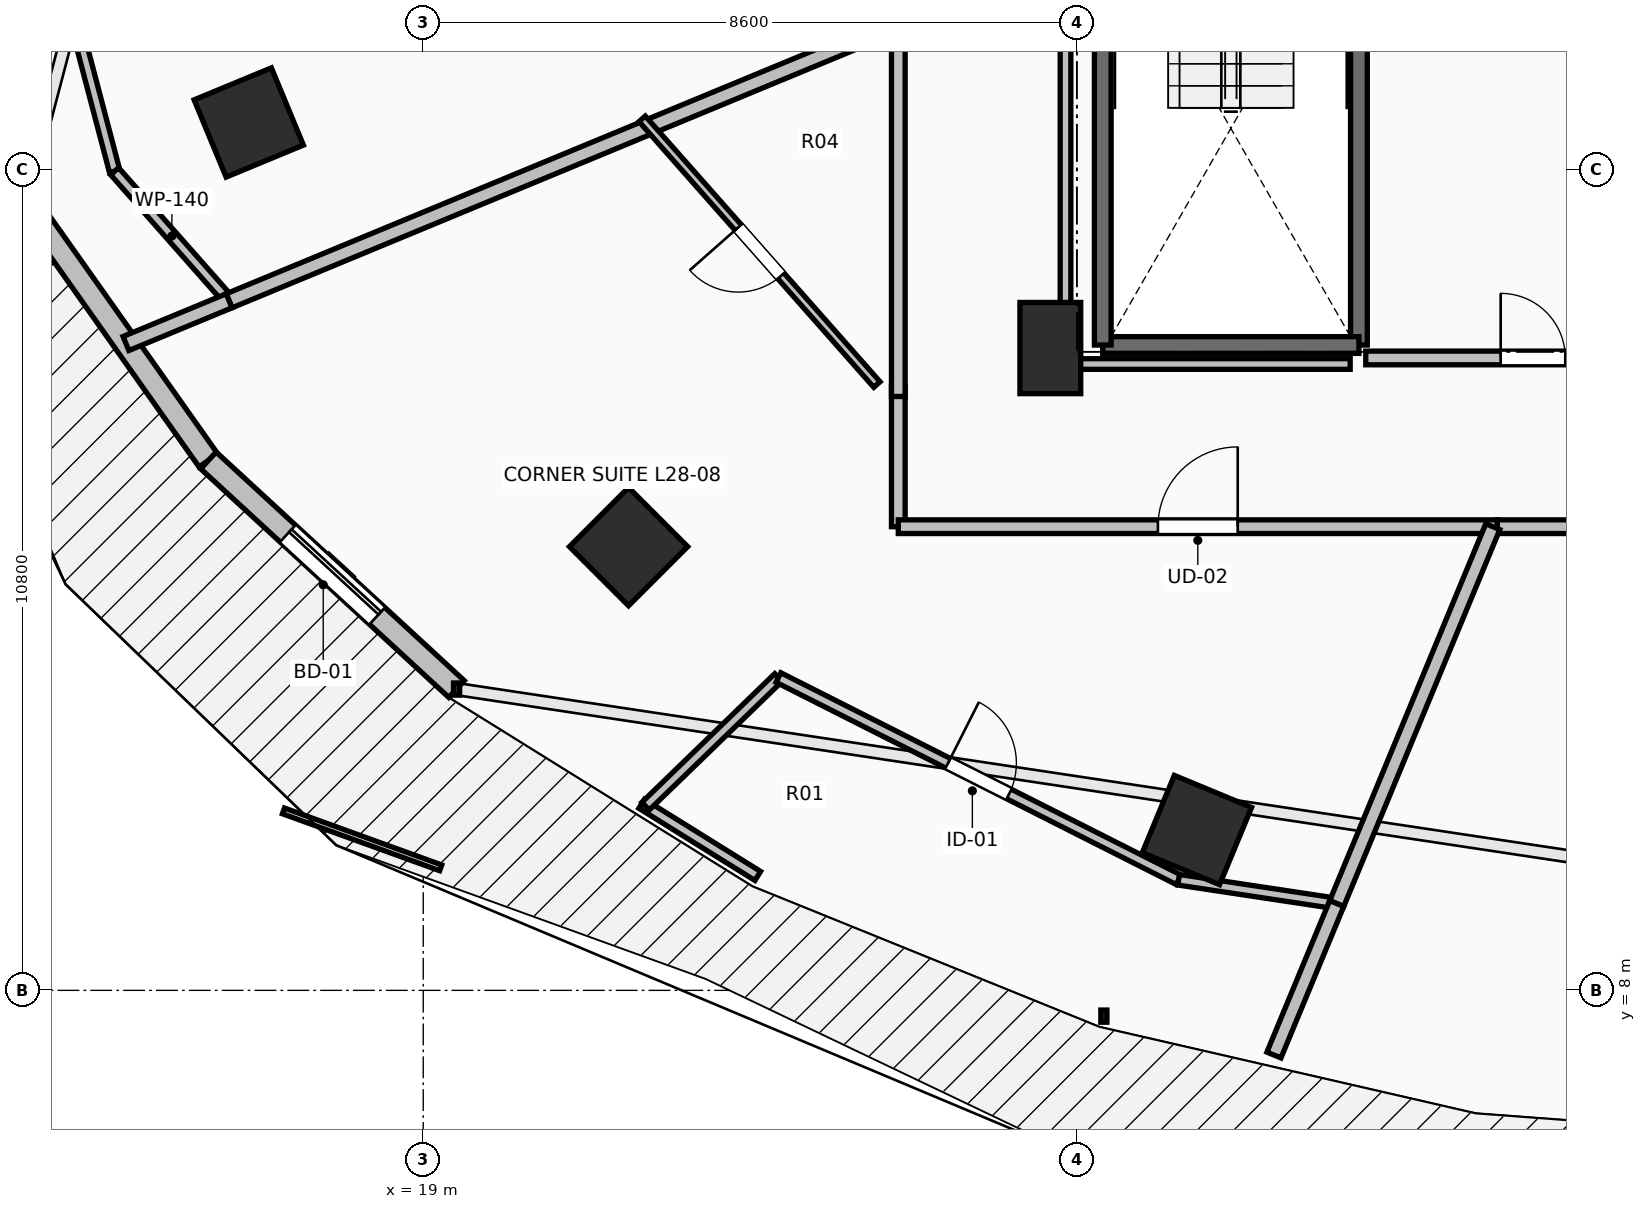
"""IFC4 building model, lengths in metres.
Left out: names, types, materials, properties, quantities, classifications, styles, units other than length and angle.
Written with IfcOpenShell. Run it as: python <this file> out.ifc"""

import sys

from ifc_helpers import new_model, si_unit, direction, frame, frame_2d, origin, origin_2d, place, context, subcontext, project, spatial, rectangle, extrude, element, fill, save


model = new_model("IFC4")
c1 = context("Model", 3, precision=1e-05, world=origin(), true_north=direction((0.0, 1.0)))
c2 = subcontext(c1, "Body", "Model", "MODEL_VIEW")
j1 = project(units=[si_unit("LENGTHUNIT", "METRE"), si_unit("PLANEANGLEUNIT", "RADIAN")], contexts=[c1])
p1 = place(None, origin())
s1 = spatial("IfcSite", under=j1, at=p1, CompositionType="ELEMENT")
p2 = place(p1, origin())
s2 = spatial("IfcBuilding", under=s1, at=p2, CompositionType="ELEMENT")
p3 = place(p2, frame((0.0, 0.0, 106.8)))
s3 = spatial("IfcBuildingStorey", under=s2, at=p3, CompositionType="ELEMENT", Elevation=106.8)
for number, where, z_axis, x_axis in (
    (1, (16.705, 19.418, 0.0), (0.0, 0.0, 1.0), (-0.924, -0.383, 0.0)),
    (2, (21.701, 13.838, 0.0), (0.0, 0.0, 1.0), (-0.707, -0.707, 0.0)),
    (3, (29.179, 10.109, 0.0), (0.0, 0.0, 1.0), (-0.383, -0.924, 0.0)),
):
    element("IfcColumn", number, at=place(p3, frame(where, z_axis=z_axis, x_axis=x_axis)), inside=s3, PredefinedType="COLUMN", context=c2, shape_type="SweptSolid", body=[
        extrude(rectangle(XDim=1.1, YDim=1.1, at=origin_2d()), origin(), (0.0, 0.0, 1.0), 3.5),
    ])
p4 = place(p3, frame((27.25, 16.45, 0.0), z_axis=(0.0, 0.0, 1.0), x_axis=(1.0, 0.0, 0.0)))
e4 = element("IfcColumn", 4, at=p4, inside=s3, PredefinedType="PILASTER", context=c2, shape_type="SweptSolid", body=[
    extrude(rectangle(XDim=0.8, YDim=1.2, at=origin_2d()), origin(), (0.0, 0.0, 1.0), 3.5),
])
p5 = place(p3, frame((13.748, 18.404, 0.0), z_axis=(0.0, 0.0, 1.0), x_axis=(0.57716435238, -0.81662801222, 0.0)))
e5 = element("IfcWall", 5, at=p5, inside=s3, PredefinedType="STANDARD", context=c2, shape_type="SweptSolid", body=[
    extrude(rectangle(XDim=4.202, YDim=0.3, at=frame_2d((2.101, 0.0))), origin(), (0.0, 0.0, 1.0), 3.24),
])
p6 = place(p3, frame((16.174, 14.972, 0.0), z_axis=(0.0, 0.0, 1.0), x_axis=(0.735416718093, -0.677615119924, 0.0)))
e6 = element("IfcWall", 6, at=p6, inside=s3, PredefinedType="STANDARD", context=c2, shape_type="SweptSolid", body=[
    extrude(rectangle(XDim=4.439, YDim=0.3, at=frame_2d((2.22, 0.0))), origin(), (0.0, 0.0, 1.0), 3.24),
])
p7 = place(p6, frame((1.419, 0.0, 0.0)))
e7 = element("IfcOpeningElement", 7, at=p7, cuts=e6, PredefinedType="OPENING", context=c2, shape_type="SweptSolid", body=[
    extrude(rectangle(XDim=1.6, YDim=2.3, at=frame_2d((0.8, 1.15))), frame((0.0, 0.165, 0.0), z_axis=(0.0, -1.0, 0.0), x_axis=(1.0, 0.0, 0.0)), (0.0, 0.0, 1.0), 0.33),
])
p8 = place(p3, frame((31.31, 23.91, 0.0), z_axis=(0.0, 0.0, 1.0), x_axis=(0.0, -1.0, 0.0)))
e8 = element("IfcWall", 8, at=p8, inside=s3, PredefinedType="SOLIDWALL", context=c2, shape_type="SweptSolid", body=[
    extrude(rectangle(XDim=7.42, YDim=0.22, at=frame_2d((3.71, 0.0))), origin(), (0.0, 0.0, 1.0), 3.24),
])
p9 = place(p3, frame((31.31, 16.49, 0.0), z_axis=(0.0, 0.0, 1.0), x_axis=(-1.0, 0.0, 0.0)))
e9 = element("IfcWall", 9, at=p9, inside=s3, PredefinedType="SOLIDWALL", context=c2, shape_type="SweptSolid", body=[
    extrude(rectangle(XDim=3.37, YDim=0.22, at=frame_2d((1.685, 0.0))), origin(), (0.0, 0.0, 1.0), 3.24),
])
p10 = place(p3, frame((27.94, 16.49, 0.0), z_axis=(0.0, 0.0, 1.0), x_axis=(0.0, 1.0, 0.0)))
e10 = element("IfcWall", 10, at=p10, inside=s3, PredefinedType="SOLIDWALL", context=c2, shape_type="SweptSolid", body=[
    extrude(rectangle(XDim=7.42, YDim=0.22, at=frame_2d((3.71, 0.0))), origin(), (0.0, 0.0, 1.0), 3.24),
])
p11 = place(p3, frame((31.4, 16.32, 0.0), z_axis=(0.0, 0.0, 1.0), x_axis=(1.0, 0.0, 0.0)))
e11 = element("IfcWall", 11, at=p11, inside=s3, PredefinedType="PARTITIONING", context=c2, shape_type="SweptSolid", body=[
    extrude(rectangle(XDim=4.4, YDim=0.18, at=frame_2d((2.2, 0.0))), origin(), (0.0, 0.0, 1.0), 3.24),
])
p12 = place(p11, frame((1.775, 0.0, 0.0)))
e12 = element("IfcOpeningElement", 12, at=p12, cuts=e11, PredefinedType="OPENING", context=c2, shape_type="SweptSolid", body=[
    extrude(rectangle(XDim=0.85, YDim=2.1, at=frame_2d((0.425, 1.05))), frame((0.0, 0.105, 0.0), z_axis=(0.0, -1.0, 0.0), x_axis=(1.0, 0.0, 0.0)), (0.0, 0.0, 1.0), 0.21),
])
p13 = place(p3, frame((25.25, 15.953, 0.0), z_axis=(0.0, 0.0, 1.0), x_axis=(0.0, -1.0, 0.0)))
e13 = element("IfcWall", 13, at=p13, inside=s3, PredefinedType="PARTITIONING", context=c2, shape_type="SweptSolid", body=[
    extrude(rectangle(XDim=1.853, YDim=0.18, at=frame_2d((0.926, 0.0))), origin(), (0.0, 0.0, 1.0), 2.432),
])
p14 = place(p3, frame((25.25, 14.1, 0.0), z_axis=(0.0, 0.0, 1.0), x_axis=(1.0, 0.0, 0.0)))
e14 = element("IfcWall", 14, at=p14, inside=s3, PredefinedType="PARTITIONING", context=c2, shape_type="SweptSolid", body=[
    extrude(rectangle(XDim=7.881, YDim=0.18, at=frame_2d((3.94, 0.0))), origin(), (0.0, 0.0, 1.0), 2.432),
])
p15 = place(p14, frame((3.416, 0.0, 0.0)))
e15 = element("IfcOpeningElement", 15, at=p15, cuts=e14, PredefinedType="OPENING", context=c2, shape_type="SweptSolid", body=[
    extrude(rectangle(XDim=1.05, YDim=2.2, at=frame_2d((0.525, 1.1))), frame((0.0, 0.105, 0.0), z_axis=(0.0, -1.0, 0.0), x_axis=(1.0, 0.0, 0.0)), (0.0, 0.0, 1.0), 0.21),
])
p16 = place(p3, frame((25.25, 20.794, 0.0), z_axis=(0.0, 0.0, 1.0), x_axis=(0.0, -1.0, 0.0)))
e16 = element("IfcWall", 16, at=p16, inside=s3, PredefinedType="PARTITIONING", context=c2, shape_type="SweptSolid", body=[
    extrude(rectangle(XDim=4.981, YDim=0.18, at=frame_2d((2.49, 0.0))), origin(), (0.0, 0.0, 1.0), 2.432),
])
p17 = place(p3, frame((33.131, 14.1, 0.0), z_axis=(0.0, 0.0, 1.0), x_axis=(1.0, 0.0, 0.0)))
e17 = element("IfcWall", 17, at=p17, inside=s3, PredefinedType="PARTITIONING", context=c2, shape_type="SweptSolid", body=[
    extrude(rectangle(XDim=9.069, YDim=0.18, at=frame_2d((4.534, 0.0))), origin(), (0.0, 0.0, 1.0), 2.886),
])
p18 = place(p17, frame((4.034, 0.0, 0.0)))
e18 = element("IfcOpeningElement", 18, at=p18, cuts=e17, PredefinedType="OPENING", context=c2, shape_type="SweptSolid", body=[
    extrude(rectangle(XDim=1.0, YDim=2.15, at=frame_2d((0.5, 1.075))), frame((0.0, 0.105, 0.0), z_axis=(0.0, -1.0, 0.0), x_axis=(1.0, 0.0, 0.0)), (0.0, 0.0, 1.0), 0.21),
])
p19 = place(p3, frame((13.04, 26.0, 0.0), z_axis=(0.0, 0.0, 1.0), x_axis=(0.254345287821, -0.967113475536, 0.0)))
e19 = element("IfcWall", 19, at=p19, inside=s3, PredefinedType="PARTITIONING", context=c2, shape_type="SweptSolid", body=[
    extrude(rectangle(XDim=7.47, YDim=0.14, at=frame_2d((3.735, 0.0))), origin(), (0.0, 0.0, 1.0), 3.24),
])
p20 = place(p19, frame((3.285, 0.0, 0.0)))
e20 = element("IfcOpeningElement", 20, at=p20, cuts=e19, PredefinedType="OPENING", context=c2, shape_type="SweptSolid", body=[
    extrude(rectangle(XDim=0.9, YDim=2.1, at=frame_2d((0.45, 1.05))), frame((0.0, 0.085, 0.0), z_axis=(0.0, -1.0, 0.0), x_axis=(1.0, 0.0, 0.0)), (0.0, 0.0, 1.0), 0.17),
])
p21 = place(p3, frame((14.94, 18.776, 0.0), z_axis=(0.0, 0.0, 1.0), x_axis=(0.662288913482, -0.749248553605, 0.0)))
e21 = element("IfcWall", 21, at=p21, inside=s3, PredefinedType="PARTITIONING", context=c2, shape_type="SweptSolid", body=[
    extrude(rectangle(XDim=2.274, YDim=0.14, at=frame_2d((1.137, 0.0))), origin(), (0.0, 0.0, 1.0), 3.24),
])
p22 = place(p3, frame((16.446, 17.072, 0.0), z_axis=(0.0, 0.0, 1.0), x_axis=(0.92387006918, 0.382706278068, 0.0)))
e22 = element("IfcWall", 22, at=p22, inside=s3, PredefinedType="PARTITIONING", context=c2, shape_type="SweptSolid", body=[
    extrude(rectangle(XDim=9.53, YDim=0.2, at=frame_2d((4.765, 0.0))), origin(), (0.0, 0.0, 1.0), 2.432),
])
p23 = place(p3, frame((15.089, 16.51, 0.0), z_axis=(0.0, 0.0, 1.0), x_axis=(0.923891226159, 0.382655200183, 0.0)))
e23 = element("IfcWall", 23, at=p23, inside=s3, PredefinedType="PARTITIONING", context=c2, shape_type="SweptSolid", body=[
    extrude(rectangle(XDim=1.469, YDim=0.2, at=frame_2d((0.734, 0.0))), origin(), (0.0, 0.0, 1.0), 3.24),
])
p24 = place(p3, frame((24.969, 15.97, 0.0), z_axis=(0.0, 0.0, 1.0), x_axis=(-0.662106207726, 0.749410014405, 0.0)))
e24 = element("IfcWall", 24, at=p24, inside=s3, PredefinedType="PARTITIONING", context=c2, shape_type="SweptSolid", body=[
    extrude(rectangle(XDim=4.665, YDim=0.11, at=frame_2d((2.332, 0.0))), origin(), (0.0, 0.0, 1.0), 2.432),
])
p25 = place(p24, frame((1.907, 0.0, 0.0)))
e25 = element("IfcOpeningElement", 25, at=p25, cuts=e24, PredefinedType="OPENING", context=c2, shape_type="SweptSolid", body=[
    extrude(rectangle(XDim=0.85, YDim=2.1, at=frame_2d((0.425, 1.05))), frame((0.0, 0.07, 0.0), z_axis=(0.0, -1.0, 0.0), x_axis=(1.0, 0.0, 0.0)), (0.0, 0.0, 1.0), 0.14),
])
p26 = place(p3, frame((21.874, 10.455, 0.0), z_axis=(0.0, 0.0, 1.0), x_axis=(0.849018711668, -0.528362779951, 0.0)))
e26 = element("IfcWall", 26, at=p26, inside=s3, PredefinedType="PARTITIONING", context=c2, shape_type="SweptSolid", body=[
    extrude(rectangle(XDim=1.798, YDim=0.14, at=frame_2d((0.899, 0.0))), origin(), (0.0, 0.0, 1.0), 3.24),
])
p27 = place(p3, frame((21.925, 10.423, 0.0), z_axis=(0.0, 0.0, 1.0), x_axis=(0.718353026202, 0.695678754704, 0.0)))
e27 = element("IfcWall", 27, at=p27, inside=s3, PredefinedType="PARTITIONING", context=c2, shape_type="SweptSolid", body=[
    extrude(rectangle(XDim=2.433, YDim=0.14, at=frame_2d((1.217, 0.0))), origin(), (0.0, 0.0, 1.0), 3.24),
])
p28 = place(p3, frame((23.673, 12.116, 0.0), z_axis=(0.0, 0.0, 1.0), x_axis=(0.892490283816, -0.451066617357, 0.0)))
e28 = element("IfcWall", 28, at=p28, inside=s3, PredefinedType="PARTITIONING", context=c2, shape_type="SweptSolid", body=[
    extrude(rectangle(XDim=5.899, YDim=0.14, at=frame_2d((2.95, 0.0))), origin(), (0.0, 0.0, 1.0), 3.24),
])
p29 = place(p28, frame((2.5, 0.0, 0.0)))
e29 = element("IfcOpeningElement", 29, at=p29, cuts=e28, PredefinedType="OPENING", context=c2, shape_type="SweptSolid", body=[
    extrude(rectangle(XDim=0.9, YDim=2.1, at=frame_2d((0.45, 1.05))), frame((0.0, 0.085, 0.0), z_axis=(0.0, -1.0, 0.0), x_axis=(1.0, 0.0, 0.0)), (0.0, 0.0, 1.0), 0.17),
])
p30 = place(p3, frame((28.938, 9.455, 0.0), z_axis=(0.0, 0.0, 1.0), x_axis=(0.988868142427, -0.148794478708, 0.0)))
e30 = element("IfcWall", 30, at=p30, inside=s3, PredefinedType="PARTITIONING", context=c2, shape_type="SweptSolid", body=[
    extrude(rectangle(XDim=2.104, YDim=0.14, at=frame_2d((1.052, 0.0))), origin(), (0.0, 0.0, 1.0), 3.24),
])
p31 = place(p3, frame((31.018, 9.142, 0.0), z_axis=(0.0, 0.0, 1.0), x_axis=(0.382572793579, 0.923925352836, 0.0)))
e31 = element("IfcWall", 31, at=p31, inside=s3, PredefinedType="PARTITIONING", context=c2, shape_type="SweptSolid", body=[
    extrude(rectangle(XDim=5.366, YDim=0.2, at=frame_2d((2.683, 0.0))), origin(), (0.0, 0.0, 1.0), 2.677),
])
p32 = place(p3, frame((30.192, 7.149, 0.0), z_axis=(0.0, 0.0, 1.0), x_axis=(0.382911401564, 0.923785071622, 0.0)))
e32 = element("IfcWall", 32, at=p32, inside=s3, PredefinedType="PARTITIONING", context=c2, shape_type="SweptSolid", body=[
    extrude(rectangle(XDim=2.158, YDim=0.2, at=frame_2d((1.079, 0.0))), origin(), (0.0, 0.0, 1.0), 3.24),
])
p33 = place(p3, frame((31.195, 16.24, 0.0), z_axis=(0.0, 0.0, 1.0), x_axis=(-1.0, 0.0, 0.0)))
e33 = element("IfcWall", 33, at=p33, inside=s3, PredefinedType="PARTITIONING", context=c2, shape_type="SweptSolid", body=[
    extrude(rectangle(XDim=3.745, YDim=0.14, at=frame_2d((1.873, 0.0))), origin(), (0.0, 0.0, 1.0), 2.432),
])
p34 = place(p3, frame((27.45, 16.24, 0.0), z_axis=(0.0, 0.0, 1.0), x_axis=(0.0, 1.0, 0.0)))
e34 = element("IfcWall", 34, at=p34, inside=s3, PredefinedType="PARTITIONING", context=c2, shape_type="SweptSolid", body=[
    extrude(rectangle(XDim=7.514, YDim=0.14, at=frame_2d((3.757, 0.0))), origin(), (0.0, 0.0, 1.0), 2.432),
])
p35 = place(p7, origin())
e35 = element("IfcDoor", 35, at=p35, inside=s3, OperationType="SLIDING_TO_LEFT", PredefinedType="DOOR", context=c2, shape_type="SweptSolid", body=[
    extrude(rectangle(XDim=1.6, YDim=2.3, at=frame_2d((0.8, 1.15))), frame((0.0, 0.025, 0.0), z_axis=(0.0, -1.0, 0.0), x_axis=(1.0, 0.0, 0.0)), (0.0, 0.0, 1.0), 0.05),
])
fill(e7, e35)
p36 = place(p12, origin())
e36 = element("IfcDoor", 36, at=p36, inside=s3, OperationType="SINGLE_SWING_LEFT", PredefinedType="DOOR", context=c2, shape_type="SweptSolid", body=[
    extrude(rectangle(XDim=0.85, YDim=2.1, at=frame_2d((0.425, 1.05))), frame((0.0, 0.025, 0.0), z_axis=(0.0, -1.0, 0.0), x_axis=(1.0, 0.0, 0.0)), (0.0, 0.0, 1.0), 0.05),
])
fill(e12, e36)
p37 = place(p15, origin())
e37 = element("IfcDoor", 37, at=p37, inside=s3, OperationType="SINGLE_SWING_RIGHT", PredefinedType="DOOR", context=c2, shape_type="SweptSolid", body=[
    extrude(rectangle(XDim=1.05, YDim=2.2, at=frame_2d((0.525, 1.1))), frame((0.0, 0.025, 0.0), z_axis=(0.0, -1.0, 0.0), x_axis=(1.0, 0.0, 0.0)), (0.0, 0.0, 1.0), 0.05),
])
fill(e15, e37)
p38 = place(p25, origin())
e38 = element("IfcDoor", 38, at=p38, inside=s3, OperationType="SINGLE_SWING_RIGHT", PredefinedType="DOOR", context=c2, shape_type="SweptSolid", body=[
    extrude(rectangle(XDim=0.85, YDim=2.1, at=frame_2d((0.425, 1.05))), frame((0.0, 0.025, 0.0), z_axis=(0.0, -1.0, 0.0), x_axis=(1.0, 0.0, 0.0)), (0.0, 0.0, 1.0), 0.05),
])
fill(e25, e38)
p39 = place(p29, origin())
e39 = element("IfcDoor", 39, at=p39, inside=s3, OperationType="SINGLE_SWING_LEFT", PredefinedType="DOOR", context=c2, shape_type="SweptSolid", body=[
    extrude(rectangle(XDim=0.9, YDim=2.1, at=frame_2d((0.45, 1.05))), frame((0.0, 0.025, 0.0), z_axis=(0.0, -1.0, 0.0), x_axis=(1.0, 0.0, 0.0)), (0.0, 0.0, 1.0), 0.05),
])
fill(e29, e39)
save(model, sys.argv[1])
